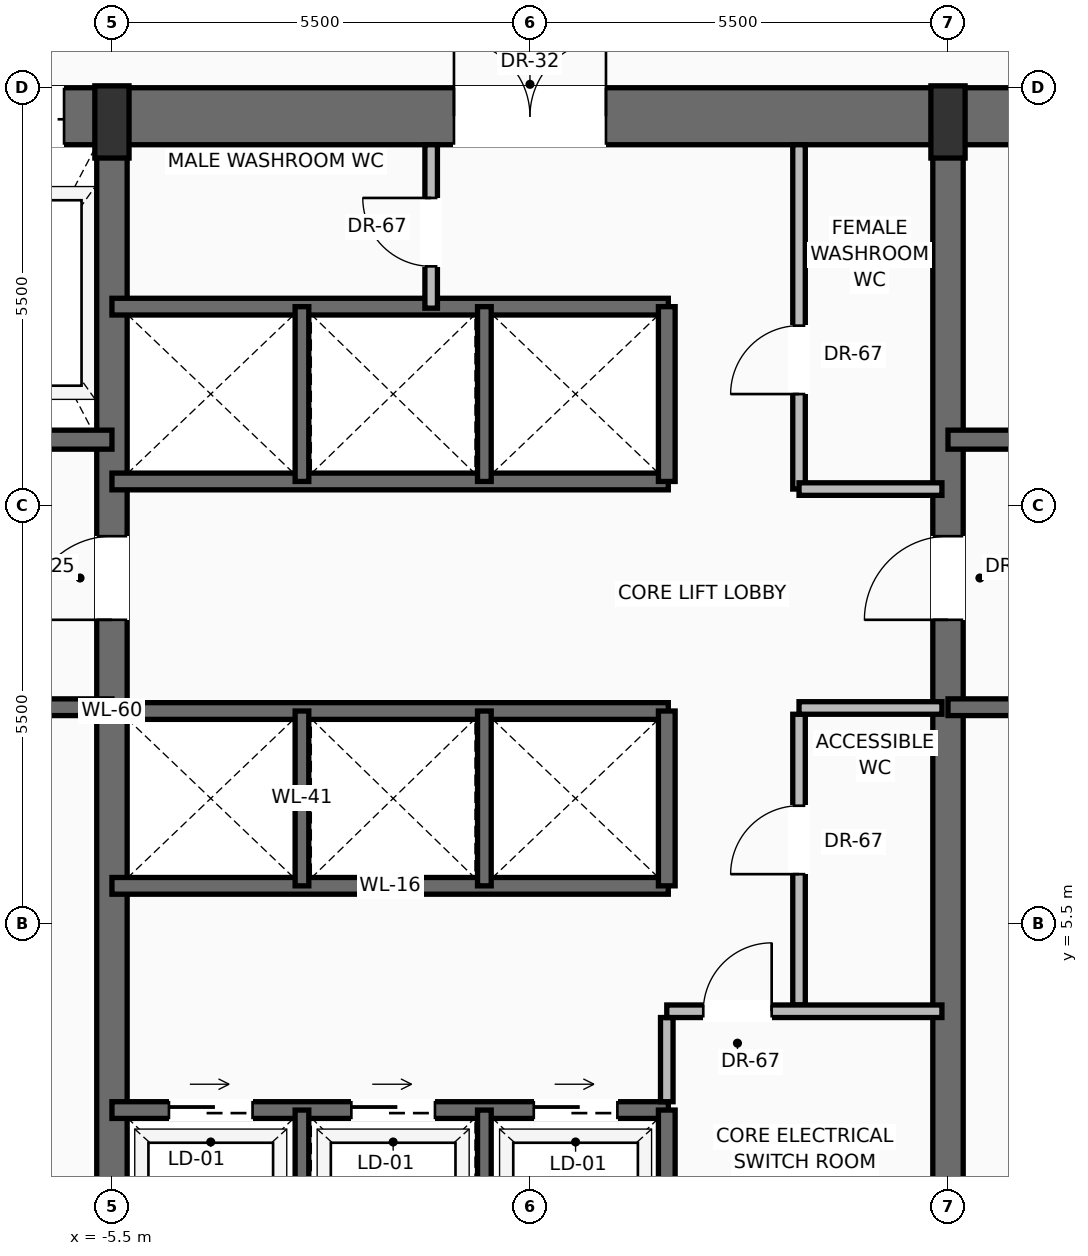
"""IFC4 building model, lengths in metres.
Left out: names, types, materials, properties, quantities, classifications, styles, units other than length and angle.
Written with IfcOpenShell. Run it as: python <this file> out.ifc"""

import sys

from ifc_helpers import new_model, si_unit, direction, frame, frame_2d, origin, origin_2d, place, context, subcontext, project, spatial, rectangle, extrude, source, transform, mapped, element, fill, save


model = new_model("IFC4")
c1 = context("Model", 3, precision=1e-05, world=origin(), true_north=direction((0.0, 1.0)))
c2 = subcontext(c1, "Body", "Model", "MODEL_VIEW")
j1 = project(units=[si_unit("LENGTHUNIT", "METRE"), si_unit("PLANEANGLEUNIT", "RADIAN")], contexts=[c1])
p1 = place(None, origin())
s1 = spatial("IfcSite", under=j1, at=p1, CompositionType="ELEMENT")
p2 = place(p1, origin())
s2 = spatial("IfcBuilding", under=s1, at=p2, CompositionType="ELEMENT")
p3 = place(p2, frame((0.0, 0.0, 80.3)))
s3 = spatial("IfcBuildingStorey", under=s2, at=p3, CompositionType="ELEMENT", Elevation=80.3)
p4 = place(p3, frame((-10.9, 16.125, 0.0), z_axis=(0.0, 0.0, 1.0), x_axis=(1.0, 0.0, 0.0)))
e1 = element("IfcWall", 1, at=p4, inside=s3, PredefinedType="SHEAR", context=c2, shape_type="SweptSolid", body=[
    extrude(rectangle(XDim=21.8, YDim=0.75, at=frame_2d((10.9, 0.0))), origin(), (0.0, 0.0, 1.0), 3.45),
])
p5 = place(p4, frame((3.47, 0.0, 0.0)))
e2 = element("IfcOpeningElement", 2, at=p5, cuts=e1, PredefinedType="OPENING", context=c2, shape_type="SweptSolid", body=[
    extrude(rectangle(XDim=1.3, YDim=2.3, at=frame_2d((0.65, 1.15))), frame((0.0, 0.385, 0.0), z_axis=(0.0, -1.0, 0.0), x_axis=(1.0, 0.0, 0.0)), (0.0, 0.0, 1.0), 0.77),
])
p6 = place(p4, frame((9.9, 0.0, 0.0)))
e3 = element("IfcOpeningElement", 3, at=p6, cuts=e1, PredefinedType="OPENING", context=c2, shape_type="SweptSolid", body=[
    extrude(rectangle(XDim=2.0, YDim=2.4, at=frame_2d((1.0, 1.2))), frame((0.0, 0.385, 0.0), z_axis=(0.0, -1.0, 0.0), x_axis=(1.0, 0.0, 0.0)), (0.0, 0.0, 1.0), 0.77),
])
p7 = place(p3, frame((-5.5, 0.475, 0.0), z_axis=(0.0, 0.0, 1.0), x_axis=(0.0, 1.0, 0.0)))
e4 = element("IfcWall", 4, at=p7, inside=s3, PredefinedType="SHEAR", context=c2, shape_type="SweptSolid", body=[
    extrude(rectangle(XDim=15.65, YDim=0.4, at=frame_2d((7.825, 0.0))), origin(), (0.0, 0.0, 1.0), 3.45),
])
p8 = place(p7, frame((9.025, 0.0, 0.0)))
e5 = element("IfcOpeningElement", 5, at=p8, cuts=e4, PredefinedType="OPENING", context=c2, shape_type="SweptSolid", body=[
    extrude(rectangle(XDim=1.1, YDim=2.2, at=frame_2d((0.55, 1.1))), frame((0.0, 0.21, 0.0), z_axis=(0.0, -1.0, 0.0), x_axis=(1.0, 0.0, 0.0)), (0.0, 0.0, 1.0), 0.42),
])
p9 = place(p3, frame((5.5, 0.475, 0.0), z_axis=(0.0, 0.0, 1.0), x_axis=(0.0, 1.0, 0.0)))
e6 = element("IfcWall", 6, at=p9, inside=s3, PredefinedType="SHEAR", context=c2, shape_type="SweptSolid", body=[
    extrude(rectangle(XDim=15.65, YDim=0.4, at=frame_2d((7.825, 0.0))), origin(), (0.0, 0.0, 1.0), 3.45),
])
p10 = place(p9, frame((9.025, 0.0, 0.0)))
e7 = element("IfcOpeningElement", 7, at=p10, cuts=e6, PredefinedType="OPENING", context=c2, shape_type="SweptSolid", body=[
    extrude(rectangle(XDim=1.1, YDim=2.2, at=frame_2d((0.55, 1.1))), frame((0.0, 0.21, 0.0), z_axis=(0.0, -1.0, 0.0), x_axis=(1.0, 0.0, 0.0)), (0.0, 0.0, 1.0), 0.42),
])
m1 = source(origin(), c2, "Body", "SweptSolid", [
    extrude(rectangle(XDim=0.45, YDim=0.95, at=origin_2d()), origin(), (0.0, 0.0, 1.0), 3.7),
])
for number, where, z_axis, x_axis in (
    (8, (-5.5, 16.05, 0.0), (0.0, 0.0, 1.0), (1.0, 0.0, 0.0)),
    (9, (5.5, 16.05, 0.0), (0.0, 0.0, 1.0), (1.0, 0.0, 0.0)),
):
    element("IfcColumn", number, at=place(p3, frame(where, z_axis=z_axis, x_axis=x_axis)), inside=s3, PredefinedType="PILASTER", context=c2, shape_type="MappedRepresentation", body=[
        mapped(m1, transform((0.0, 0.0, 0.0), scale=1.0)),
    ])
p11 = place(p3, frame((-5.5, 8.35, 0.0), z_axis=(0.0, 0.0, 1.0), x_axis=(-1.0, 0.0, 0.0)))
e10 = element("IfcWall", 10, at=p11, inside=s3, PredefinedType="SOLIDWALL", context=c2, shape_type="SweptSolid", body=[
    extrude(rectangle(XDim=4.65, YDim=0.22, at=frame_2d((2.325, 0.0))), origin(), (0.0, 0.0, 1.0), 3.45),
])
p12 = place(p11, frame((2.5, 0.0, 0.0)))
e11 = element("IfcOpeningElement", 11, at=p12, cuts=e10, PredefinedType="OPENING", context=c2, shape_type="SweptSolid", body=[
    extrude(rectangle(XDim=1.15, YDim=2.2, at=frame_2d((0.575, 1.1))), frame((0.0, 0.12, 0.0), z_axis=(0.0, -1.0, 0.0), x_axis=(1.0, 0.0, 0.0)), (0.0, 0.0, 1.0), 0.24),
])
p13 = place(p3, frame((-5.5, 11.87, 0.0), z_axis=(0.0, 0.0, 1.0), x_axis=(-1.0, 0.0, 0.0)))
e12 = element("IfcWall", 12, at=p13, inside=s3, PredefinedType="SOLIDWALL", context=c2, shape_type="SweptSolid", body=[
    extrude(rectangle(XDim=4.65, YDim=0.25, at=frame_2d((2.325, 0.0))), origin(), (0.0, 0.0, 1.0), 3.45),
])
p14 = place(p13, frame((2.95, 0.0, 0.0)))
e13 = element("IfcOpeningElement", 13, at=p14, cuts=e12, PredefinedType="OPENING", context=c2, shape_type="SweptSolid", body=[
    extrude(rectangle(XDim=1.2, YDim=2.25, at=frame_2d((0.6, 1.125))), frame((0.0, 0.135, 0.0), z_axis=(0.0, -1.0, 0.0), x_axis=(1.0, 0.0, 0.0)), (0.0, 0.0, 1.0), 0.27),
])
p15 = place(p3, frame((10.15, 8.35, 0.0), z_axis=(0.0, 0.0, 1.0), x_axis=(-1.0, 0.0, 0.0)))
e14 = element("IfcWall", 14, at=p15, inside=s3, PredefinedType="SOLIDWALL", context=c2, shape_type="SweptSolid", body=[
    extrude(rectangle(XDim=4.65, YDim=0.22, at=frame_2d((2.325, 0.0))), origin(), (0.0, 0.0, 1.0), 3.45),
])
p16 = place(p15, frame((1.0, 0.0, 0.0)))
e15 = element("IfcOpeningElement", 15, at=p16, cuts=e14, PredefinedType="OPENING", context=c2, shape_type="SweptSolid", body=[
    extrude(rectangle(XDim=1.15, YDim=2.2, at=frame_2d((0.575, 1.1))), frame((0.0, 0.12, 0.0), z_axis=(0.0, -1.0, 0.0), x_axis=(1.0, 0.0, 0.0)), (0.0, 0.0, 1.0), 0.24),
])
p17 = place(p3, frame((10.15, 11.87, 0.0), z_axis=(0.0, 0.0, 1.0), x_axis=(-1.0, 0.0, 0.0)))
e16 = element("IfcWall", 16, at=p17, inside=s3, PredefinedType="SOLIDWALL", context=c2, shape_type="SweptSolid", body=[
    extrude(rectangle(XDim=4.65, YDim=0.25, at=frame_2d((2.325, 0.0))), origin(), (0.0, 0.0, 1.0), 3.45),
])
p18 = place(p17, frame((0.5, 0.0, 0.0)))
e17 = element("IfcOpeningElement", 17, at=p18, cuts=e16, PredefinedType="OPENING", context=c2, shape_type="SweptSolid", body=[
    extrude(rectangle(XDim=1.2, YDim=2.25, at=frame_2d((0.6, 1.125))), frame((0.0, 0.135, 0.0), z_axis=(0.0, -1.0, 0.0), x_axis=(1.0, 0.0, 0.0)), (0.0, 0.0, 1.0), 0.27),
])
p19 = place(p3, frame((-5.5, 3.05, 0.0), z_axis=(0.0, 0.0, 1.0), x_axis=(1.0, 0.0, 0.0)))
e18 = element("IfcWall", 18, at=p19, inside=s3, PredefinedType="SOLIDWALL", context=c2, shape_type="SweptSolid", body=[
    extrude(rectangle(XDim=7.32, YDim=0.22, at=frame_2d((3.66, 0.0))), origin(), (0.0, 0.0, 1.0), 3.45),
])
p20 = place(p19, frame((0.75, 0.0, 0.0)))
e19 = element("IfcOpeningElement", 19, at=p20, cuts=e18, PredefinedType="OPENING", context=c2, shape_type="SweptSolid", body=[
    extrude(rectangle(XDim=1.1, YDim=2.2, at=frame_2d((0.55, 1.1))), frame((0.0, 0.12, 0.0), z_axis=(0.0, -1.0, 0.0), x_axis=(1.0, 0.0, 0.0)), (0.0, 0.0, 1.0), 0.24),
])
p21 = place(p19, frame((3.15, 0.0, 0.0)))
e20 = element("IfcOpeningElement", 20, at=p21, cuts=e18, PredefinedType="OPENING", context=c2, shape_type="SweptSolid", body=[
    extrude(rectangle(XDim=1.1, YDim=2.2, at=frame_2d((0.55, 1.1))), frame((0.0, 0.12, 0.0), z_axis=(0.0, -1.0, 0.0), x_axis=(1.0, 0.0, 0.0)), (0.0, 0.0, 1.0), 0.24),
])
p22 = place(p19, frame((5.55, 0.0, 0.0)))
e21 = element("IfcOpeningElement", 21, at=p22, cuts=e18, PredefinedType="OPENING", context=c2, shape_type="SweptSolid", body=[
    extrude(rectangle(XDim=1.1, YDim=2.2, at=frame_2d((0.55, 1.1))), frame((0.0, 0.12, 0.0), z_axis=(0.0, -1.0, 0.0), x_axis=(1.0, 0.0, 0.0)), (0.0, 0.0, 1.0), 0.24),
])
p23 = place(p3, frame((1.8, 0.85, 0.0), z_axis=(0.0, 0.0, 1.0), x_axis=(0.0, 1.0, 0.0)))
e22 = element("IfcWall", 22, at=p23, inside=s3, PredefinedType="SOLIDWALL", context=c2, shape_type="SweptSolid", body=[
    extrude(rectangle(XDim=2.2, YDim=0.22, at=frame_2d((1.1, 0.0))), origin(), (0.0, 0.0, 1.0), 3.45),
])
for number, where, z_axis, x_axis in (
    (23, (-3.0, 0.85, 0.0), (0.0, 0.0, 1.0), (0.0, 1.0, 0.0)),
    (24, (-0.6, 0.85, 0.0), (0.0, 0.0, 1.0), (0.0, 1.0, 0.0)),
):
    element("IfcWall", number, at=place(p3, frame(where, z_axis=z_axis, x_axis=x_axis)), inside=s3, PredefinedType="SOLIDWALL", context=c2, shape_type="SweptSolid", body=[
        extrude(rectangle(XDim=2.2, YDim=0.18, at=frame_2d((1.1, 0.0))), origin(), (0.0, 0.0, 1.0), 3.45),
    ])
p24 = place(p3, frame((1.8, 3.16, 0.0), z_axis=(0.0, 0.0, 1.0), x_axis=(0.0, 1.0, 0.0)))
e25 = element("IfcWall", 25, at=p24, inside=s3, PredefinedType="PARTITIONING", context=c2, shape_type="SweptSolid", body=[
    extrude(rectangle(XDim=1.108, YDim=0.165, at=frame_2d((0.554, 0.0))), origin(), (0.0, 0.0, 1.0), 3.442),
])
p25 = place(p3, frame((3.54, 4.433, 0.0), z_axis=(0.0, 0.0, 1.0), x_axis=(0.0, 1.0, 0.0)))
e26 = element("IfcWall", 26, at=p25, inside=s3, PredefinedType="PARTITIONING", context=c2, shape_type="SweptSolid", body=[
    extrude(rectangle(XDim=3.825, YDim=0.165, at=frame_2d((1.913, 0.0))), origin(), (0.0, 0.0, 1.0), 3.442),
])
p26 = place(p25, frame((1.721, 0.0, 0.0)))
e27 = element("IfcOpeningElement", 27, at=p26, cuts=e26, PredefinedType="OPENING", context=c2, shape_type="SweptSolid", body=[
    extrude(rectangle(XDim=0.9, YDim=2.1, at=frame_2d((0.45, 1.05))), frame((0.0, 0.093, 0.0), z_axis=(0.0, -1.0, 0.0), x_axis=(1.0, 0.0, 0.0)), (0.0, 0.0, 1.0), 0.185),
])
p27 = place(p3, frame((3.54, 8.34, 0.0), z_axis=(0.0, 0.0, 1.0), x_axis=(1.0, 0.0, 0.0)))
e28 = element("IfcWall", 28, at=p27, inside=s3, PredefinedType="PARTITIONING", context=c2, shape_type="SweptSolid", body=[
    extrude(rectangle(XDim=1.88, YDim=0.165, at=frame_2d((0.94, 0.0))), origin(), (0.0, 0.0, 1.0), 3.442),
])
p28 = place(p3, frame((1.8, 4.35, 0.0), z_axis=(0.0, 0.0, 1.0), x_axis=(1.0, 0.0, 0.0)))
e29 = element("IfcWall", 29, at=p28, inside=s3, PredefinedType="PARTITIONING", context=c2, shape_type="SweptSolid", body=[
    extrude(rectangle(XDim=3.62, YDim=0.165, at=frame_2d((1.81, 0.0))), origin(), (0.0, 0.0, 1.0), 3.442),
])
p29 = place(p28, frame((0.48, 0.0, 0.0)))
e30 = element("IfcOpeningElement", 30, at=p29, cuts=e29, PredefinedType="OPENING", context=c2, shape_type="SweptSolid", body=[
    extrude(rectangle(XDim=0.9, YDim=2.1, at=frame_2d((0.45, 1.05))), frame((0.0, 0.093, 0.0), z_axis=(0.0, -1.0, 0.0), x_axis=(1.0, 0.0, 0.0)), (0.0, 0.0, 1.0), 0.185),
])
for number, where, z_axis, x_axis in (
    (31, (-5.5, 6.0, 0.0), (0.0, 0.0, 1.0), (1.0, 0.0, 0.0)),
    (32, (-5.5, 8.3, 0.0), (0.0, 0.0, 1.0), (1.0, 0.0, 0.0)),
):
    element("IfcWall", number, at=place(p3, frame(where, z_axis=z_axis, x_axis=x_axis)), inside=s3, PredefinedType="SOLIDWALL", context=c2, shape_type="SweptSolid", body=[
        extrude(rectangle(XDim=7.32, YDim=0.22, at=frame_2d((3.66, 0.0))), origin(), (0.0, 0.0, 1.0), 3.45),
    ])
p30 = place(p3, frame((1.8, 6.0, 0.0), z_axis=(0.0, 0.0, 1.0), x_axis=(0.0, 1.0, 0.0)))
e33 = element("IfcWall", 33, at=p30, inside=s3, PredefinedType="SOLIDWALL", context=c2, shape_type="SweptSolid", body=[
    extrude(rectangle(XDim=2.3, YDim=0.22, at=frame_2d((1.15, 0.0))), origin(), (0.0, 0.0, 1.0), 3.45),
])
for number, where, z_axis, x_axis in (
    (34, (-3.0, 6.0, 0.0), (0.0, 0.0, 1.0), (0.0, 1.0, 0.0)),
    (35, (-0.6, 6.0, 0.0), (0.0, 0.0, 1.0), (0.0, 1.0, 0.0)),
):
    element("IfcWall", number, at=place(p3, frame(where, z_axis=z_axis, x_axis=x_axis)), inside=s3, PredefinedType="SOLIDWALL", context=c2, shape_type="SweptSolid", body=[
        extrude(rectangle(XDim=2.3, YDim=0.18, at=frame_2d((1.15, 0.0))), origin(), (0.0, 0.0, 1.0), 3.45),
    ])
for number, where, z_axis, x_axis in (
    (36, (-5.5, 11.32, 0.0), (0.0, 0.0, 1.0), (1.0, 0.0, 0.0)),
    (37, (-5.5, 13.62, 0.0), (0.0, 0.0, 1.0), (1.0, 0.0, 0.0)),
):
    element("IfcWall", number, at=place(p3, frame(where, z_axis=z_axis, x_axis=x_axis)), inside=s3, PredefinedType="SOLIDWALL", context=c2, shape_type="SweptSolid", body=[
        extrude(rectangle(XDim=7.32, YDim=0.22, at=frame_2d((3.66, 0.0))), origin(), (0.0, 0.0, 1.0), 3.45),
    ])
p31 = place(p3, frame((1.8, 11.32, 0.0), z_axis=(0.0, 0.0, 1.0), x_axis=(0.0, 1.0, 0.0)))
e38 = element("IfcWall", 38, at=p31, inside=s3, PredefinedType="SOLIDWALL", context=c2, shape_type="SweptSolid", body=[
    extrude(rectangle(XDim=2.3, YDim=0.22, at=frame_2d((1.15, 0.0))), origin(), (0.0, 0.0, 1.0), 3.45),
])
for number, where, z_axis, x_axis in (
    (39, (-3.0, 11.32, 0.0), (0.0, 0.0, 1.0), (0.0, 1.0, 0.0)),
    (40, (-0.6, 11.32, 0.0), (0.0, 0.0, 1.0), (0.0, 1.0, 0.0)),
):
    element("IfcWall", number, at=place(p3, frame(where, z_axis=z_axis, x_axis=x_axis)), inside=s3, PredefinedType="SOLIDWALL", context=c2, shape_type="SweptSolid", body=[
        extrude(rectangle(XDim=2.3, YDim=0.18, at=frame_2d((1.15, 0.0))), origin(), (0.0, 0.0, 1.0), 3.45),
    ])
p32 = place(p3, frame((-1.3, 13.6, 0.0), z_axis=(0.0, 0.0, 1.0), x_axis=(0.0, 1.0, 0.0)))
e41 = element("IfcWall", 41, at=p32, inside=s3, PredefinedType="PARTITIONING", context=c2, shape_type="SweptSolid", body=[
    extrude(rectangle(XDim=2.15, YDim=0.165, at=frame_2d((1.075, 0.0))), origin(), (0.0, 0.0, 1.0), 3.442),
])
p33 = place(p32, frame((0.55, 0.0, 0.0)))
e42 = element("IfcOpeningElement", 42, at=p33, cuts=e41, PredefinedType="OPENING", context=c2, shape_type="SweptSolid", body=[
    extrude(rectangle(XDim=0.9, YDim=2.1, at=frame_2d((0.45, 1.05))), frame((0.0, 0.093, 0.0), z_axis=(0.0, -1.0, 0.0), x_axis=(1.0, 0.0, 0.0)), (0.0, 0.0, 1.0), 0.185),
])
p34 = place(p3, frame((3.54, 11.22, 0.0), z_axis=(0.0, 0.0, 1.0), x_axis=(0.0, 1.0, 0.0)))
e43 = element("IfcWall", 43, at=p34, inside=s3, PredefinedType="PARTITIONING", context=c2, shape_type="SweptSolid", body=[
    extrude(rectangle(XDim=4.53, YDim=0.165, at=frame_2d((2.265, 0.0))), origin(), (0.0, 0.0, 1.0), 3.442),
])
p35 = place(p34, frame((1.25, 0.0, 0.0)))
e44 = element("IfcOpeningElement", 44, at=p35, cuts=e43, PredefinedType="OPENING", context=c2, shape_type="SweptSolid", body=[
    extrude(rectangle(XDim=0.9, YDim=2.1, at=frame_2d((0.45, 1.05))), frame((0.0, 0.093, 0.0), z_axis=(0.0, -1.0, 0.0), x_axis=(1.0, 0.0, 0.0)), (0.0, 0.0, 1.0), 0.185),
])
p36 = place(p3, frame((3.54, 11.22, 0.0), z_axis=(0.0, 0.0, 1.0), x_axis=(1.0, 0.0, 0.0)))
e45 = element("IfcWall", 45, at=p36, inside=s3, PredefinedType="PARTITIONING", context=c2, shape_type="SweptSolid", body=[
    extrude(rectangle(XDim=1.88, YDim=0.165, at=frame_2d((0.94, 0.0))), origin(), (0.0, 0.0, 1.0), 3.442),
])
m2 = source(origin(), c2, "Body", "SweptSolid", [
    extrude(rectangle(XDim=1.1, YDim=2.2, at=frame_2d((0.55, 1.1))), frame((0.0, 0.025, 0.0), z_axis=(0.0, -1.0, 0.0), x_axis=(1.0, 0.0, 0.0)), (0.0, 0.0, 1.0), 0.05),
])
p37 = place(p8, origin())
e46 = element("IfcDoor", 46, at=p37, inside=s3, OperationType="SINGLE_SWING_LEFT", PredefinedType="DOOR", context=c2, shape_type="MappedRepresentation", body=[
    mapped(m2, transform((0.0, 0.0, 0.0), scale=1.0)),
])
fill(e5, e46)
m3 = source(origin(), c2, "Body", "SweptSolid", [
    extrude(rectangle(XDim=1.3, YDim=2.3, at=frame_2d((0.65, 1.15))), frame((0.0, 0.025, 0.0), z_axis=(0.0, -1.0, 0.0), x_axis=(1.0, 0.0, 0.0)), (0.0, 0.0, 1.0), 0.05),
])
p38 = place(p5, origin())
e47 = element("IfcDoor", 47, at=p38, inside=s3, OperationType="SLIDING_TO_RIGHT", PredefinedType="DOOR", context=c2, shape_type="MappedRepresentation", body=[
    mapped(m3, transform((0.0, 0.0, 0.0), scale=1.0)),
])
fill(e2, e47)
p39 = place(p10, origin())
e48 = element("IfcDoor", 48, at=p39, inside=s3, OperationType="SINGLE_SWING_LEFT", PredefinedType="DOOR", context=c2, shape_type="MappedRepresentation", body=[
    mapped(m2, transform((0.0, 0.0, 0.0), scale=1.0)),
])
fill(e7, e48)
m4 = source(origin(), c2, "Body", "SweptSolid", [
    extrude(rectangle(XDim=2.0, YDim=2.4, at=frame_2d((1.0, 1.2))), frame((0.0, 0.025, 0.0), z_axis=(0.0, -1.0, 0.0), x_axis=(1.0, 0.0, 0.0)), (0.0, 0.0, 1.0), 0.05),
])
p40 = place(p6, origin())
e49 = element("IfcDoor", 49, at=p40, inside=s3, OperationType="DOUBLE_DOOR_SINGLE_SWING", PredefinedType="DOOR", context=c2, shape_type="MappedRepresentation", body=[
    mapped(m4, transform((0.0, 0.0, 0.0), scale=1.0)),
])
fill(e3, e49)
m5 = source(origin(), c2, "Body", "SweptSolid", [
    extrude(rectangle(XDim=1.1, YDim=2.2, at=frame_2d((0.55, 1.1))), frame((0.0, 0.025, 0.0), z_axis=(0.0, -1.0, 0.0), x_axis=(1.0, 0.0, 0.0)), (0.0, 0.0, 1.0), 0.05),
])
p41 = place(p20, origin())
e50 = element("IfcDoor", 50, at=p41, inside=s3, OperationType="SLIDING_TO_RIGHT", PredefinedType="DOOR", context=c2, shape_type="MappedRepresentation", body=[
    mapped(m5, transform((0.0, 0.0, 0.0), scale=1.0)),
])
fill(e19, e50)
p42 = place(p21, origin())
e51 = element("IfcDoor", 51, at=p42, inside=s3, OperationType="SLIDING_TO_RIGHT", PredefinedType="DOOR", context=c2, shape_type="MappedRepresentation", body=[
    mapped(m5, transform((0.0, 0.0, 0.0), scale=1.0)),
])
fill(e20, e51)
p43 = place(p22, origin())
e52 = element("IfcDoor", 52, at=p43, inside=s3, OperationType="SLIDING_TO_RIGHT", PredefinedType="DOOR", context=c2, shape_type="MappedRepresentation", body=[
    mapped(m5, transform((0.0, 0.0, 0.0), scale=1.0)),
])
fill(e21, e52)
m6 = source(origin(), c2, "Body", "SweptSolid", [
    extrude(rectangle(XDim=0.9, YDim=2.1, at=frame_2d((0.45, 1.05))), frame((0.0, 0.025, 0.0), z_axis=(0.0, -1.0, 0.0), x_axis=(1.0, 0.0, 0.0)), (0.0, 0.0, 1.0), 0.05),
])
p44 = place(p29, origin())
e53 = element("IfcDoor", 53, at=p44, inside=s3, OperationType="SINGLE_SWING_RIGHT", PredefinedType="DOOR", context=c2, shape_type="MappedRepresentation", body=[
    mapped(m6, transform((0.0, 0.0, 0.0), scale=1.0)),
])
fill(e30, e53)
p45 = place(p26, origin())
e54 = element("IfcDoor", 54, at=p45, inside=s3, OperationType="SINGLE_SWING_LEFT", PredefinedType="DOOR", context=c2, shape_type="MappedRepresentation", body=[
    mapped(m6, transform((0.0, 0.0, 0.0), scale=1.0)),
])
fill(e27, e54)
p46 = place(p33, origin())
e55 = element("IfcDoor", 55, at=p46, inside=s3, OperationType="SINGLE_SWING_RIGHT", PredefinedType="DOOR", context=c2, shape_type="MappedRepresentation", body=[
    mapped(m6, transform((0.0, 0.0, 0.0), scale=1.0)),
])
fill(e42, e55)
p47 = place(p35, origin())
e56 = element("IfcDoor", 56, at=p47, inside=s3, OperationType="SINGLE_SWING_LEFT", PredefinedType="DOOR", context=c2, shape_type="MappedRepresentation", body=[
    mapped(m6, transform((0.0, 0.0, 0.0), scale=1.0)),
])
fill(e44, e56)
save(model, sys.argv[1])
